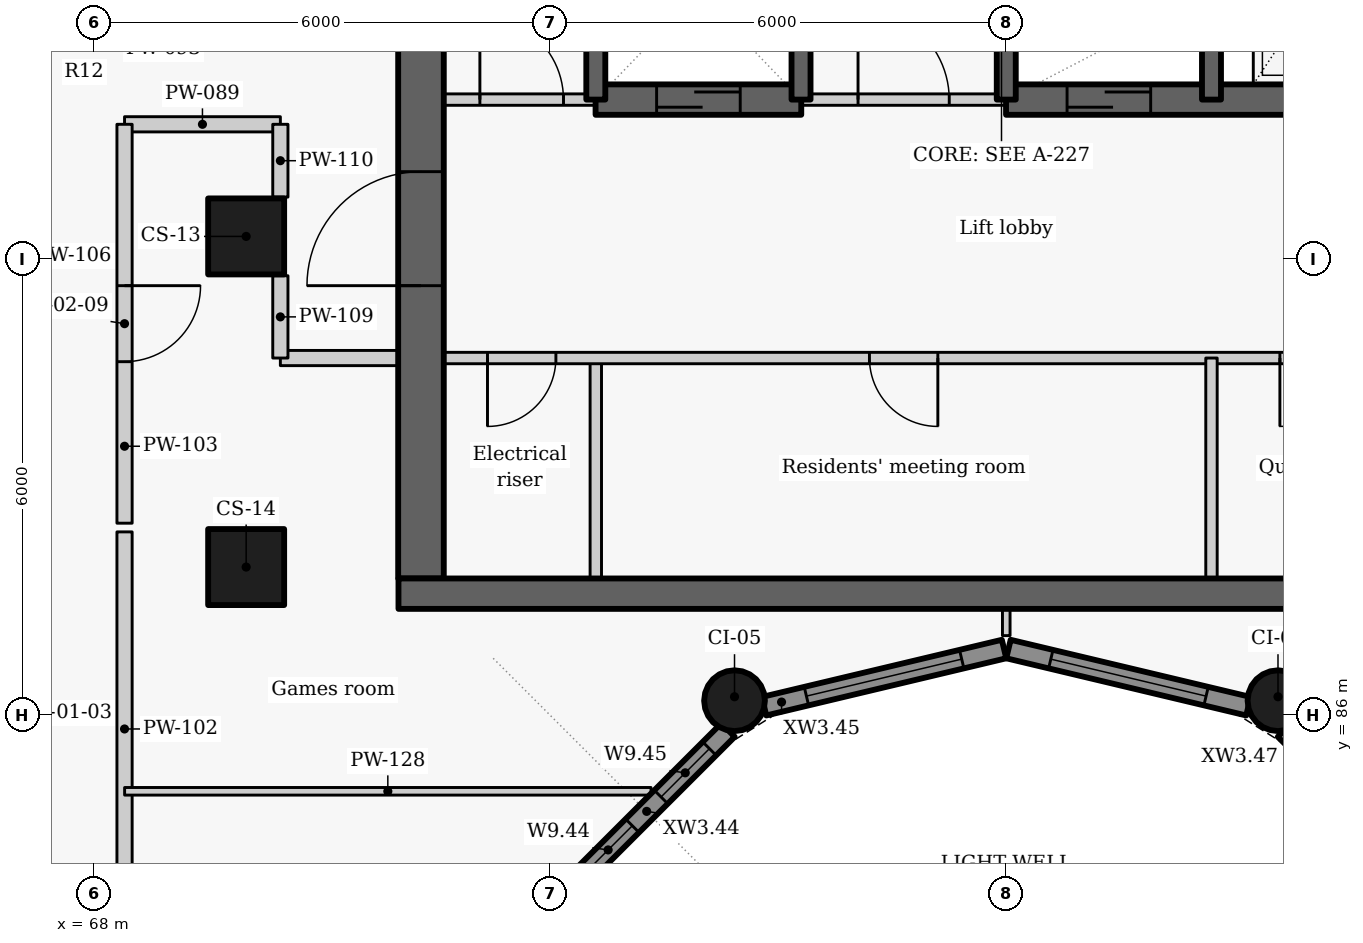
"""IFC4 building model, lengths in metres.
Left out: names, types, materials, properties, quantities, classifications, styles, units other than length and angle.
Written with IfcOpenShell. Run it as: python <this file> out.ifc"""

import sys

from ifc_helpers import new_model, si_unit, direction, frame, frame_2d, origin, origin_2d, place, context, subcontext, project, spatial, rectangle, circle, extrude, element, fill, save


model = new_model("IFC4")
c1 = context("Model", 3, precision=1e-05, world=origin(), true_north=direction((0.0, 1.0)))
c2 = subcontext(c1, "Body", "Model", "MODEL_VIEW")
j1 = project(units=[si_unit("LENGTHUNIT", "METRE"), si_unit("PLANEANGLEUNIT", "RADIAN")], contexts=[c1])
p1 = place(None, origin())
s1 = spatial("IfcSite", under=j1, at=p1, CompositionType="ELEMENT")
p2 = place(p1, origin())
s2 = spatial("IfcBuilding", under=s1, at=p2, CompositionType="ELEMENT")
p3 = place(p2, frame((0.0, 0.0, 150.3)))
s3 = spatial("IfcBuildingStorey", under=s2, at=p3, CompositionType="ELEMENT", Elevation=150.3)
for number, where, z_axis, x_axis in (
    (1, (70.0, 92.3, 0.0), (0.0, 0.0, 1.0), (0.0, -1.0, 0.0)),
    (2, (70.0, 87.95, 0.0), (0.0, 0.0, 1.0), (0.0, -1.0, 0.0)),
):
    element("IfcColumn", number, at=place(p3, frame(where, z_axis=z_axis, x_axis=x_axis)), inside=s3, PredefinedType="COLUMN", context=c2, shape_type="SweptSolid", body=[
        extrude(rectangle(XDim=1.0, YDim=1.0, at=origin_2d()), origin(), (0.0, 0.0, 1.0), 3.3),
    ])
for number, where, z_axis, x_axis in (
    (3, (83.575, 86.192, 0.0), (0.0, 0.0, 1.0), (-0.866, 0.5, 0.0)),
    (4, (76.425, 86.192, 0.0), (0.0, 0.0, 1.0), (-0.866, -0.5, 0.0)),
):
    element("IfcColumn", number, at=place(p3, frame(where, z_axis=z_axis, x_axis=x_axis)), inside=s3, PredefinedType="COLUMN", context=c2, shape_type="SweptSolid", body=[
        extrude(circle(Radius=0.4, at=origin_2d()), origin(), (0.0, 0.0, 1.0), 3.3),
    ])
p4 = place(p3, frame((74.194, 83.661, 0.0), z_axis=(0.0, 0.0, 1.0), x_axis=(0.707106781187, 0.707106781187, 0.0)))
e5 = element("IfcWall", 5, at=p4, inside=s3, PredefinedType="SOLIDWALL", context=c2, shape_type="SweptSolid", body=[
    extrude(rectangle(XDim=3.033, YDim=0.25, at=frame_2d((1.517, 0.0))), origin(), (0.0, 0.0, 1.0), 2.425),
])
p5 = place(p4, frame((0.353, 0.0, 0.9)))
e6 = element("IfcOpeningElement", 6, at=p5, cuts=e5, PredefinedType="OPENING", context=c2, shape_type="SweptSolid", body=[
    extrude(rectangle(XDim=0.9, YDim=1.1, at=frame_2d((0.45, 0.55))), frame((0.0, 0.135, 0.0), z_axis=(0.0, -1.0, 0.0), x_axis=(1.0, 0.0, 0.0)), (0.0, 0.0, 1.0), 0.27),
])
p6 = place(p4, frame((1.788, 0.0, 0.9)))
e7 = element("IfcOpeningElement", 7, at=p6, cuts=e5, PredefinedType="OPENING", context=c2, shape_type="SweptSolid", body=[
    extrude(rectangle(XDim=0.9, YDim=1.1, at=frame_2d((0.45, 0.55))), frame((0.0, 0.135, 0.0), z_axis=(0.0, -1.0, 0.0), x_axis=(1.0, 0.0, 0.0)), (0.0, 0.0, 1.0), 0.27),
])
p7 = place(p3, frame((76.814, 86.119, 0.0), z_axis=(0.0, 0.0, 1.0), x_axis=(0.972773113459, 0.231759508395, 0.0)))
e8 = element("IfcWall", 8, at=p7, inside=s3, PredefinedType="SOLIDWALL", context=c2, shape_type="SweptSolid", body=[
    extrude(rectangle(XDim=3.246, YDim=0.25, at=frame_2d((1.623, 0.0))), origin(), (0.0, 0.0, 1.0), 2.425),
])
p8 = place(p7, frame((0.573, 0.0, 0.9)))
e9 = element("IfcOpeningElement", 9, at=p8, cuts=e8, PredefinedType="OPENING", context=c2, shape_type="SweptSolid", body=[
    extrude(rectangle(XDim=2.1, YDim=1.1, at=frame_2d((1.05, 0.55))), frame((0.0, 0.135, 0.0), z_axis=(0.0, -1.0, 0.0), x_axis=(1.0, 0.0, 0.0)), (0.0, 0.0, 1.0), 0.27),
])
p9 = place(p3, frame((80.029, 86.872, 0.0), z_axis=(0.0, 0.0, 1.0), x_axis=(0.972773113459, -0.231759508395, 0.0)))
e10 = element("IfcWall", 10, at=p9, inside=s3, PredefinedType="SOLIDWALL", context=c2, shape_type="SweptSolid", body=[
    extrude(rectangle(XDim=3.246, YDim=0.25, at=frame_2d((1.623, 0.0))), origin(), (0.0, 0.0, 1.0), 2.425),
])
p10 = place(p9, frame((0.573, 0.0, 0.9)))
e11 = element("IfcOpeningElement", 11, at=p10, cuts=e10, PredefinedType="OPENING", context=c2, shape_type="SweptSolid", body=[
    extrude(rectangle(XDim=2.1, YDim=1.1, at=frame_2d((1.05, 0.55))), frame((0.0, 0.135, 0.0), z_axis=(0.0, -1.0, 0.0), x_axis=(1.0, 0.0, 0.0)), (0.0, 0.0, 1.0), 0.27),
])
p11 = place(p3, frame((83.661, 85.806, 0.0), z_axis=(0.0, 0.0, 1.0), x_axis=(0.707106781187, -0.707106781187, 0.0)))
e12 = element("IfcWall", 12, at=p11, inside=s3, PredefinedType="SOLIDWALL", context=c2, shape_type="SweptSolid", body=[
    extrude(rectangle(XDim=3.033, YDim=0.25, at=frame_2d((1.517, 0.0))), origin(), (0.0, 0.0, 1.0), 2.425),
])
p12 = place(p11, frame((0.467, 0.0, 0.9)))
e13 = element("IfcOpeningElement", 13, at=p12, cuts=e12, PredefinedType="OPENING", context=c2, shape_type="SweptSolid", body=[
    extrude(rectangle(XDim=2.1, YDim=1.1, at=frame_2d((1.05, 0.55))), frame((0.0, 0.135, 0.0), z_axis=(0.0, -1.0, 0.0), x_axis=(1.0, 0.0, 0.0)), (0.0, 0.0, 1.0), 0.27),
])
p13 = place(p3, frame((74.6, 87.8, 0.0), z_axis=(0.0, 0.0, 1.0), x_axis=(0.0, 1.0, 0.0)))
e14 = element("IfcWall", 14, at=p13, inside=s3, PredefinedType="PARTITIONING", context=c2, shape_type="SweptSolid", body=[
    extrude(rectangle(XDim=2.9, YDim=0.15, at=frame_2d((1.45, 0.0))), origin(), (0.0, 0.0, 1.0), 3.025),
])
p14 = place(p3, frame((85.4, 90.7, 0.0), z_axis=(0.0, 0.0, 1.0), x_axis=(-1.0, 0.0, 0.0)))
e15 = element("IfcWall", 15, at=p14, inside=s3, PredefinedType="PARTITIONING", context=c2, shape_type="SweptSolid", body=[
    extrude(rectangle(XDim=13.4, YDim=0.15, at=frame_2d((6.7, 0.0))), origin(), (0.0, 0.0, 1.0), 3.025),
])
p15 = place(p14, frame((11.325, 0.0, 0.0)))
e16 = element("IfcOpeningElement", 16, at=p15, cuts=e15, PredefinedType="OPENING", context=c2, shape_type="SweptSolid", body=[
    extrude(rectangle(XDim=0.9, YDim=2.1, at=frame_2d((0.45, 1.05))), frame((0.0, 0.085, 0.0), z_axis=(0.0, -1.0, 0.0), x_axis=(1.0, 0.0, 0.0)), (0.0, 0.0, 1.0), 0.17),
])
p16 = place(p14, frame((6.3, 0.0, 0.0)))
e17 = element("IfcOpeningElement", 17, at=p16, cuts=e15, PredefinedType="OPENING", context=c2, shape_type="SweptSolid", body=[
    extrude(rectangle(XDim=0.9, YDim=2.1, at=frame_2d((0.45, 1.05))), frame((0.0, 0.085, 0.0), z_axis=(0.0, -1.0, 0.0), x_axis=(1.0, 0.0, 0.0)), (0.0, 0.0, 1.0), 0.17),
])
p17 = place(p14, frame((0.9, 0.0, 0.0)))
e18 = element("IfcOpeningElement", 18, at=p17, cuts=e15, PredefinedType="OPENING", context=c2, shape_type="SweptSolid", body=[
    extrude(rectangle(XDim=0.9, YDim=2.1, at=frame_2d((0.45, 1.05))), frame((0.0, 0.085, 0.0), z_axis=(0.0, -1.0, 0.0), x_axis=(1.0, 0.0, 0.0)), (0.0, 0.0, 1.0), 0.17),
])
p18 = place(p3, frame((72.3, 87.8, -0.275), z_axis=(0.0, 0.0, 1.0), x_axis=(0.0, 1.0, 0.0)))
e19 = element("IfcWall", 19, at=p18, inside=s3, PredefinedType="SHEAR", context=c2, shape_type="SweptSolid", body=[
    extrude(rectangle(XDim=9.1, YDim=0.6, at=frame_2d((4.55, 0.0))), origin(), (0.0, 0.0, 1.0), 3.3),
])
p19 = place(p18, frame((3.852, 0.0, 0.275)))
e20 = element("IfcOpeningElement", 20, at=p19, cuts=e19, PredefinedType="OPENING", context=c2, shape_type="SweptSolid", body=[
    extrude(rectangle(XDim=1.5, YDim=2.1, at=frame_2d((0.75, 1.05))), frame((0.0, 0.31, 0.0), z_axis=(0.0, -1.0, 0.0), x_axis=(1.0, 0.0, 0.0)), (0.0, 0.0, 1.0), 0.62),
])
p20 = place(p3, frame((82.7, 87.8, 0.0), z_axis=(0.0, 0.0, 1.0), x_axis=(0.0, 1.0, 0.0)))
e21 = element("IfcWall", 21, at=p20, inside=s3, PredefinedType="PARTITIONING", context=c2, shape_type="SweptSolid", body=[
    extrude(rectangle(XDim=2.9, YDim=0.15, at=frame_2d((1.45, 0.0))), origin(), (0.0, 0.0, 1.0), 3.025),
])
p21 = place(p3, frame((72.0, 94.1, 0.0), z_axis=(0.0, 0.0, 1.0), x_axis=(1.0, 0.0, 0.0)))
e22 = element("IfcWall", 22, at=p21, inside=s3, PredefinedType="PARTITIONING", context=c2, shape_type="SweptSolid", body=[
    extrude(rectangle(XDim=2.603, YDim=0.15, at=frame_2d((1.302, 0.0))), origin(), (0.0, 0.0, 1.0), 3.025),
])
p22 = place(p21, frame((1.075, 0.0, 0.0)))
e23 = element("IfcOpeningElement", 23, at=p22, cuts=e22, PredefinedType="OPENING", context=c2, shape_type="SweptSolid", body=[
    extrude(rectangle(XDim=1.1, YDim=2.1, at=frame_2d((0.55, 1.05))), frame((0.0, 0.085, 0.0), z_axis=(0.0, -1.0, 0.0), x_axis=(1.0, 0.0, 0.0)), (0.0, 0.0, 1.0), 0.17),
])
p23 = place(p3, frame((77.297, 94.1, 0.0), z_axis=(0.0, 0.0, 1.0), x_axis=(1.0, 0.0, 0.0)))
e24 = element("IfcWall", 24, at=p23, inside=s3, PredefinedType="PARTITIONING", context=c2, shape_type="SweptSolid", body=[
    extrude(rectangle(XDim=2.706, YDim=0.15, at=frame_2d((1.353, 0.0))), origin(), (0.0, 0.0, 1.0), 3.025),
])
p24 = place(p23, frame((0.753, 0.0, 0.0)))
e25 = element("IfcOpeningElement", 25, at=p24, cuts=e24, PredefinedType="OPENING", context=c2, shape_type="SweptSolid", body=[
    extrude(rectangle(XDim=1.2, YDim=2.1, at=frame_2d((0.6, 1.05))), frame((0.0, 0.085, 0.0), z_axis=(0.0, -1.0, 0.0), x_axis=(1.0, 0.0, 0.0)), (0.0, 0.0, 1.0), 0.17),
])
p25 = place(p3, frame((74.597, 94.1, -0.275), z_axis=(0.0, 0.0, 1.0), x_axis=(1.0, 0.0, 0.0)))
e26 = element("IfcWall", 26, at=p25, inside=s3, PredefinedType="SHEAR", context=c2, shape_type="SweptSolid", body=[
    extrude(rectangle(XDim=2.706, YDim=0.4, at=frame_2d((1.353, 0.0))), origin(), (0.0, 0.0, 1.0), 3.3),
])
p26 = place(p25, frame((0.803, 0.0, 0.275)))
e27 = element("IfcOpeningElement", 27, at=p26, cuts=e26, PredefinedType="OPENING", context=c2, shape_type="SweptSolid", body=[
    extrude(rectangle(XDim=1.1, YDim=2.1, at=frame_2d((0.55, 1.05))), frame((0.0, 0.21, 0.0), z_axis=(0.0, -1.0, 0.0), x_axis=(1.0, 0.0, 0.0)), (0.0, 0.0, 1.0), 0.42),
])
p27 = place(p3, frame((79.997, 94.1, -0.275), z_axis=(0.0, 0.0, 1.0), x_axis=(1.0, 0.0, 0.0)))
e28 = element("IfcWall", 28, at=p27, inside=s3, PredefinedType="SHEAR", context=c2, shape_type="SweptSolid", body=[
    extrude(rectangle(XDim=5.406, YDim=0.4, at=frame_2d((2.703, 0.0))), origin(), (0.0, 0.0, 1.0), 3.3),
])
p28 = place(p27, frame((0.803, 0.0, 0.275)))
e29 = element("IfcOpeningElement", 29, at=p28, cuts=e28, PredefinedType="OPENING", context=c2, shape_type="SweptSolid", body=[
    extrude(rectangle(XDim=1.1, YDim=2.1, at=frame_2d((0.55, 1.05))), frame((0.0, 0.21, 0.0), z_axis=(0.0, -1.0, 0.0), x_axis=(1.0, 0.0, 0.0)), (0.0, 0.0, 1.0), 0.42),
])
for number, where, z_axis, x_axis in (
    (30, (74.6, 94.1, -0.275), (0.0, 0.0, 1.0), (0.0, 1.0, 0.0)),
    (31, (77.3, 94.1, -0.275), (0.0, 0.0, 1.0), (0.0, 1.0, 0.0)),
    (32, (80.0, 94.1, -0.275), (0.0, 0.0, 1.0), (0.0, 1.0, 0.0)),
    (33, (82.7, 94.1, -0.275), (0.0, 0.0, 1.0), (0.0, 1.0, 0.0)),
):
    element("IfcWall", number, at=place(p3, frame(where, z_axis=z_axis, x_axis=x_axis)), inside=s3, PredefinedType="SHEAR", context=c2, shape_type="SweptSolid", body=[
        extrude(rectangle(XDim=2.8, YDim=0.25, at=frame_2d((1.4, 0.0))), origin(), (0.0, 0.0, 1.0), 3.3),
    ])
p29 = place(p3, frame((68.4, 93.775, 0.0), z_axis=(0.0, 0.0, 1.0), x_axis=(1.0, 0.0, 0.0)))
e34 = element("IfcWall", 34, at=p29, inside=s3, PredefinedType="PARTITIONING", context=c2, shape_type="SweptSolid", body=[
    extrude(rectangle(XDim=2.05, YDim=0.2, at=frame_2d((1.025, 0.0))), origin(), (0.0, 0.0, 1.0), 2.505),
])
p30 = place(p3, frame((70.45, 90.7, 0.0), z_axis=(0.0, 0.0, 1.0), x_axis=(1.0, 0.0, 0.0)))
e35 = element("IfcWall", 35, at=p30, inside=s3, PredefinedType="PARTITIONING", context=c2, shape_type="SweptSolid", body=[
    extrude(rectangle(XDim=1.55, YDim=0.2, at=frame_2d((0.775, 0.0))), origin(), (0.0, 0.0, 1.0), 3.025),
])
p31 = place(p3, frame((68.4, 83.227, 0.0), z_axis=(0.0, 0.0, 1.0), x_axis=(0.0, 1.0, 0.0)))
e36 = element("IfcWall", 36, at=p31, inside=s3, PredefinedType="PARTITIONING", context=c2, shape_type="SweptSolid", body=[
    extrude(rectangle(XDim=5.186, YDim=0.2, at=frame_2d((2.593, 0.0))), origin(), (0.0, 0.0, 1.0), 3.025),
])
p32 = place(p3, frame((68.4, 93.775, 0.0), z_axis=(0.0, 0.0, 1.0), x_axis=(0.0, -1.0, 0.0)))
e37 = element("IfcWall", 37, at=p32, inside=s3, PredefinedType="PARTITIONING", context=c2, shape_type="SweptSolid", body=[
    extrude(rectangle(XDim=5.248, YDim=0.2, at=frame_2d((2.624, 0.0))), origin(), (0.0, 0.0, 1.0), 3.025),
])
p33 = place(p32, frame((2.123, 0.0, 0.0)))
e38 = element("IfcOpeningElement", 38, at=p33, cuts=e37, PredefinedType="OPENING", context=c2, shape_type="SweptSolid", body=[
    extrude(rectangle(XDim=1.0, YDim=2.1, at=frame_2d((0.5, 1.05))), frame((0.0, 0.11, 0.0), z_axis=(0.0, -1.0, 0.0), x_axis=(1.0, 0.0, 0.0)), (0.0, 0.0, 1.0), 0.22),
])
p34 = place(p3, frame((70.45, 90.7, 0.0), z_axis=(0.0, 0.0, 1.0), x_axis=(0.0, 1.0, 0.0)))
e39 = element("IfcWall", 39, at=p34, inside=s3, PredefinedType="PARTITIONING", context=c2, shape_type="SweptSolid", body=[
    extrude(rectangle(XDim=1.083, YDim=0.2, at=frame_2d((0.542, 0.0))), origin(), (0.0, 0.0, 1.0), 3.025),
])
p35 = place(p3, frame((70.45, 92.817, 0.0), z_axis=(0.0, 0.0, 1.0), x_axis=(0.0, 1.0, 0.0)))
e40 = element("IfcWall", 40, at=p35, inside=s3, PredefinedType="PARTITIONING", context=c2, shape_type="SweptSolid", body=[
    extrude(rectangle(XDim=0.958, YDim=0.2, at=frame_2d((0.479, 0.0))), origin(), (0.0, 0.0, 1.0), 3.025),
])
p36 = place(p3, frame((80.0, 87.048, 0.0), z_axis=(0.0, 0.0, 1.0), x_axis=(0.0, 1.0, 0.0)))
e41 = element("IfcWall", 41, at=p36, inside=s3, PredefinedType="PARTITIONING", context=c2, shape_type="SweptSolid", body=[
    extrude(rectangle(XDim=0.352, YDim=0.1, at=frame_2d((0.176, 0.0))), origin(), (0.0, 0.0, 1.0), 3.025),
])
p37 = place(p3, frame((68.401, 85.0, 0.0), z_axis=(0.0, 0.0, 1.0), x_axis=(1.0, 0.0, 0.0)))
e42 = element("IfcWall", 42, at=p37, inside=s3, PredefinedType="PARTITIONING", context=c2, shape_type="SweptSolid", body=[
    extrude(rectangle(XDim=6.926, YDim=0.1, at=frame_2d((3.463, 0.0))), origin(), (0.0, 0.0, 1.0), 2.505),
])
p38 = place(p3, frame((72.004, 87.6, -0.275), z_axis=(0.0, 0.0, 1.0), x_axis=(1.0, 0.0, 0.0)))
e43 = element("IfcWall", 43, at=p38, inside=s3, PredefinedType="SHEAR", context=c2, shape_type="SweptSolid", body=[
    extrude(rectangle(XDim=15.992, YDim=0.4, at=frame_2d((7.996, 0.0))), origin(), (0.0, 0.0, 1.0), 3.3),
])
p39 = place(p5, origin())
e44 = element("IfcWindow", 44, at=p39, inside=s3, PartitioningType="SINGLE_PANEL", PredefinedType="WINDOW", context=c2, shape_type="SweptSolid", body=[
    extrude(rectangle(XDim=0.9, YDim=1.1, at=frame_2d((0.45, 0.55))), frame((0.0, 0.03, 0.0), z_axis=(0.0, -1.0, 0.0), x_axis=(1.0, 0.0, 0.0)), (0.0, 0.0, 1.0), 0.06),
])
fill(e6, e44)
p40 = place(p6, origin())
e45 = element("IfcWindow", 45, at=p40, inside=s3, PartitioningType="SINGLE_PANEL", PredefinedType="WINDOW", context=c2, shape_type="SweptSolid", body=[
    extrude(rectangle(XDim=0.9, YDim=1.1, at=frame_2d((0.45, 0.55))), frame((0.0, 0.03, 0.0), z_axis=(0.0, -1.0, 0.0), x_axis=(1.0, 0.0, 0.0)), (0.0, 0.0, 1.0), 0.06),
])
fill(e7, e45)
p41 = place(p8, origin())
e46 = element("IfcWindow", 46, at=p41, inside=s3, PartitioningType="SINGLE_PANEL", PredefinedType="WINDOW", context=c2, shape_type="SweptSolid", body=[
    extrude(rectangle(XDim=2.1, YDim=1.1, at=frame_2d((1.05, 0.55))), frame((0.0, 0.03, 0.0), z_axis=(0.0, -1.0, 0.0), x_axis=(1.0, 0.0, 0.0)), (0.0, 0.0, 1.0), 0.06),
])
fill(e9, e46)
p42 = place(p10, origin())
e47 = element("IfcWindow", 47, at=p42, inside=s3, PartitioningType="SINGLE_PANEL", PredefinedType="WINDOW", context=c2, shape_type="SweptSolid", body=[
    extrude(rectangle(XDim=2.1, YDim=1.1, at=frame_2d((1.05, 0.55))), frame((0.0, 0.03, 0.0), z_axis=(0.0, -1.0, 0.0), x_axis=(1.0, 0.0, 0.0)), (0.0, 0.0, 1.0), 0.06),
])
fill(e11, e47)
p43 = place(p15, origin())
e48 = element("IfcDoor", 48, at=p43, inside=s3, OperationType="SINGLE_SWING_RIGHT", PredefinedType="DOOR", context=c2, shape_type="SweptSolid", body=[
    extrude(rectangle(XDim=0.9, YDim=2.1, at=frame_2d((0.45, 1.05))), frame((0.0, 0.025, 0.0), z_axis=(0.0, -1.0, 0.0), x_axis=(1.0, 0.0, 0.0)), (0.0, 0.0, 1.0), 0.05),
])
fill(e16, e48)
p44 = place(p16, origin())
e49 = element("IfcDoor", 49, at=p44, inside=s3, OperationType="SINGLE_SWING_LEFT", PredefinedType="DOOR", context=c2, shape_type="SweptSolid", body=[
    extrude(rectangle(XDim=0.9, YDim=2.1, at=frame_2d((0.45, 1.05))), frame((0.0, 0.025, 0.0), z_axis=(0.0, -1.0, 0.0), x_axis=(1.0, 0.0, 0.0)), (0.0, 0.0, 1.0), 0.05),
])
fill(e17, e49)
p45 = place(p17, origin())
e50 = element("IfcDoor", 50, at=p45, inside=s3, OperationType="SINGLE_SWING_RIGHT", PredefinedType="DOOR", context=c2, shape_type="SweptSolid", body=[
    extrude(rectangle(XDim=0.9, YDim=2.1, at=frame_2d((0.45, 1.05))), frame((0.0, 0.025, 0.0), z_axis=(0.0, -1.0, 0.0), x_axis=(1.0, 0.0, 0.0)), (0.0, 0.0, 1.0), 0.05),
])
fill(e18, e50)
p46 = place(p22, origin())
e51 = element("IfcDoor", 51, at=p46, inside=s3, OperationType="SINGLE_SWING_LEFT", PredefinedType="DOOR", context=c2, shape_type="SweptSolid", body=[
    extrude(rectangle(XDim=1.1, YDim=2.1, at=frame_2d((0.55, 1.05))), frame((0.0, 0.025, 0.0), z_axis=(0.0, -1.0, 0.0), x_axis=(1.0, 0.0, 0.0)), (0.0, 0.0, 1.0), 0.05),
])
fill(e23, e51)
p47 = place(p26, origin())
e52 = element("IfcDoor", 52, at=p47, inside=s3, OperationType="SLIDING_TO_LEFT", PredefinedType="DOOR", context=c2, shape_type="SweptSolid", body=[
    extrude(rectangle(XDim=1.1, YDim=2.1, at=frame_2d((0.55, 1.05))), frame((0.0, 0.025, 0.0), z_axis=(0.0, -1.0, 0.0), x_axis=(1.0, 0.0, 0.0)), (0.0, 0.0, 1.0), 0.05),
])
fill(e27, e52)
p48 = place(p24, origin())
e53 = element("IfcDoor", 53, at=p48, inside=s3, OperationType="DOUBLE_DOOR_SINGLE_SWING", PredefinedType="DOOR", context=c2, shape_type="SweptSolid", body=[
    extrude(rectangle(XDim=1.2, YDim=2.1, at=frame_2d((0.6, 1.05))), frame((0.0, 0.025, 0.0), z_axis=(0.0, -1.0, 0.0), x_axis=(1.0, 0.0, 0.0)), (0.0, 0.0, 1.0), 0.05),
])
fill(e25, e53)
p49 = place(p28, origin())
e54 = element("IfcDoor", 54, at=p49, inside=s3, OperationType="SLIDING_TO_LEFT", PredefinedType="DOOR", context=c2, shape_type="SweptSolid", body=[
    extrude(rectangle(XDim=1.1, YDim=2.1, at=frame_2d((0.55, 1.05))), frame((0.0, 0.025, 0.0), z_axis=(0.0, -1.0, 0.0), x_axis=(1.0, 0.0, 0.0)), (0.0, 0.0, 1.0), 0.05),
])
fill(e29, e54)
p50 = place(p33, origin())
e55 = element("IfcDoor", 55, at=p50, inside=s3, OperationType="SINGLE_SWING_LEFT", PredefinedType="DOOR", context=c2, shape_type="SweptSolid", body=[
    extrude(rectangle(XDim=1.0, YDim=2.1, at=frame_2d((0.5, 1.05))), frame((0.0, 0.025, 0.0), z_axis=(0.0, -1.0, 0.0), x_axis=(1.0, 0.0, 0.0)), (0.0, 0.0, 1.0), 0.05),
])
fill(e38, e55)
p51 = place(p19, origin())
e56 = element("IfcDoor", 56, at=p51, inside=s3, OperationType="DOUBLE_DOOR_SINGLE_SWING", PredefinedType="DOOR", context=c2, shape_type="SweptSolid", body=[
    extrude(rectangle(XDim=1.5, YDim=2.1, at=frame_2d((0.75, 1.05))), frame((0.0, 0.025, 0.0), z_axis=(0.0, -1.0, 0.0), x_axis=(1.0, 0.0, 0.0)), (0.0, 0.0, 1.0), 0.05),
])
fill(e20, e56)
save(model, sys.argv[1])
